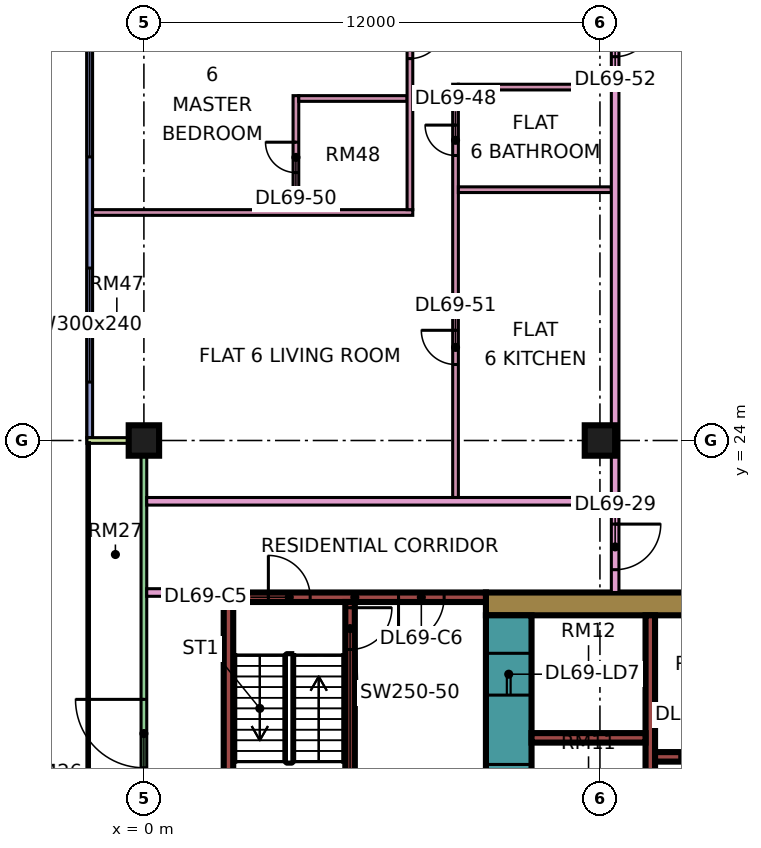
"""IFC4 building model, lengths in metres.
Left out: names, types, materials, properties, quantities, classifications, styles, units other than length and angle.
Written with IfcOpenShell. Run it as: python <this file> out.ifc"""

import sys

from ifc_helpers import new_model, si_unit, direction, frame, frame_2d, origin, origin_2d, place, context, subcontext, project, spatial, rectangle, extrude, element, fill, save


model = new_model("IFC4")
c1 = context("Model", 3, precision=1e-05, world=origin(), true_north=direction((0.0, 1.0)))
c2 = subcontext(c1, "Body", "Model", "MODEL_VIEW")
j1 = project(units=[si_unit("LENGTHUNIT", "METRE"), si_unit("PLANEANGLEUNIT", "RADIAN")], contexts=[c1])
p1 = place(None, origin())
s1 = spatial("IfcSite", under=j1, at=p1, CompositionType="ELEMENT")
p2 = place(p1, origin())
s2 = spatial("IfcBuilding", under=s1, at=p2, CompositionType="ELEMENT")
p3 = place(p2, frame((0.0, 0.0, 295.9)))
s3 = spatial("IfcBuildingStorey", under=s2, at=p3, CompositionType="ELEMENT", Elevation=295.9)
for number, where, z_axis, x_axis in (
    (1, (0.0, 24.0, 0.0), (0.0, 0.0, 1.0), (1.0, 0.0, 0.0)),
    (2, (12.0, 24.0, 0.0), (0.0, 0.0, 1.0), (1.0, 0.0, 0.0)),
):
    element("IfcColumn", number, at=place(p3, frame(where, z_axis=z_axis, x_axis=x_axis)), inside=s3, PredefinedType="COLUMN", context=c2, shape_type="SweptSolid", body=[
        extrude(rectangle(XDim=0.8, YDim=0.8, at=origin_2d()), origin(), (0.0, 0.0, 1.0), 3.75),
    ])
p4 = place(p3, frame((9.0, 19.7, 0.0), z_axis=(0.0, 0.0, 1.0), x_axis=(1.0, 0.0, 0.0)))
e3 = element("IfcWall", 3, at=p4, inside=s3, PredefinedType="SHEAR", context=c2, shape_type="SweptSolid", body=[
    extrude(rectangle(XDim=25.0, YDim=0.6, at=frame_2d((12.5, 0.0))), origin(), (0.0, 0.0, 1.0), 3.75),
])
p5 = place(p4, frame((19.1, 0.0, 0.0)))
e4 = element("IfcOpeningElement", 4, at=p5, cuts=e3, PredefinedType="OPENING", context=c2, shape_type="SweptSolid", body=[
    extrude(rectangle(XDim=1.8, YDim=2.4, at=frame_2d((0.9, 1.2))), frame((0.0, 0.31, 0.0), z_axis=(0.0, -1.0, 0.0), x_axis=(1.0, 0.0, 0.0)), (0.0, 0.0, 1.0), 0.62),
])
p6 = place(p3, frame((9.6, 7.6, 0.0), z_axis=(0.0, 0.0, 1.0), x_axis=(0.0, 1.0, 0.0)))
e5 = element("IfcWall", 5, at=p6, inside=s3, PredefinedType="SHEAR", context=c2, shape_type="SweptSolid", body=[
    extrude(rectangle(XDim=11.8, YDim=1.2, at=frame_2d((5.9, 0.0))), origin(), (0.0, 0.0, 1.0), 3.75),
])
p7 = place(p6, frame((4.275, 0.0, 0.0)))
e6 = element("IfcOpeningElement", 6, at=p7, cuts=e5, PredefinedType="OPENING", context=c2, shape_type="SweptSolid", body=[
    extrude(rectangle(XDim=1.1, YDim=2.2, at=frame_2d((0.55, 1.1))), frame((0.0, 0.61, 0.0), z_axis=(0.0, -1.0, 0.0), x_axis=(1.0, 0.0, 0.0)), (0.0, 0.0, 1.0), 1.22),
])
p8 = place(p6, frame((6.775, 0.0, 0.0)))
e7 = element("IfcOpeningElement", 7, at=p8, cuts=e5, PredefinedType="OPENING", context=c2, shape_type="SweptSolid", body=[
    extrude(rectangle(XDim=1.1, YDim=2.2, at=frame_2d((0.55, 1.1))), frame((0.0, 0.61, 0.0), z_axis=(0.0, -1.0, 0.0), x_axis=(1.0, 0.0, 0.0)), (0.0, 0.0, 1.0), 1.22),
])
p9 = place(p6, frame((9.7, 0.0, 0.0)))
e8 = element("IfcOpeningElement", 8, at=p9, cuts=e5, PredefinedType="OPENING", context=c2, shape_type="SweptSolid", body=[
    extrude(rectangle(XDim=1.1, YDim=2.2, at=frame_2d((0.55, 1.1))), frame((0.0, 0.61, 0.0), z_axis=(0.0, -1.0, 0.0), x_axis=(1.0, 0.0, 0.0)), (0.0, 0.0, 1.0), 1.22),
])
p10 = place(p6, frame((1.95, 0.0, 0.0)))
e9 = element("IfcOpeningElement", 9, at=p10, cuts=e5, PredefinedType="OPENING", context=c2, shape_type="SweptSolid", body=[
    extrude(rectangle(XDim=0.9, YDim=2.1, at=frame_2d((0.45, 1.05))), frame((0.0, 0.61, 0.0), z_axis=(0.0, -1.0, 0.0), x_axis=(1.0, 0.0, 0.0)), (0.0, 0.0, 1.0), 1.22),
])
p11 = place(p3, frame((13.325, 7.6, 0.0), z_axis=(0.0, 0.0, 1.0), x_axis=(0.0, 1.0, 0.0)))
e10 = element("IfcWall", 10, at=p11, inside=s3, PredefinedType="SHEAR", context=c2, shape_type="SweptSolid", body=[
    extrude(rectangle(XDim=11.8, YDim=0.25, at=frame_2d((5.9, 0.0))), origin(), (0.0, 0.0, 1.0), 3.75),
])
p12 = place(p3, frame((13.45, 15.675, 0.0), z_axis=(0.0, 0.0, 1.0), x_axis=(1.0, 0.0, 0.0)))
e11 = element("IfcWall", 11, at=p12, inside=s3, PredefinedType="SHEAR", context=c2, shape_type="SweptSolid", body=[
    extrude(rectangle(XDim=13.75, YDim=0.25, at=frame_2d((6.875, 0.0))), origin(), (0.0, 0.0, 1.0), 3.75),
])
p13 = place(p12, frame((0.65, 0.0, 0.0)))
e12 = element("IfcOpeningElement", 12, at=p13, cuts=e11, PredefinedType="OPENING", context=c2, shape_type="SweptSolid", body=[
    extrude(rectangle(XDim=1.2, YDim=2.2, at=frame_2d((0.6, 1.1))), frame((0.0, 0.135, 0.0), z_axis=(0.0, -1.0, 0.0), x_axis=(1.0, 0.0, 0.0)), (0.0, 0.0, 1.0), 0.27),
])
p14 = place(p12, frame((3.4, 0.0, 0.0)))
e13 = element("IfcOpeningElement", 13, at=p14, cuts=e11, PredefinedType="OPENING", context=c2, shape_type="SweptSolid", body=[
    extrude(rectangle(XDim=1.2, YDim=2.2, at=frame_2d((0.6, 1.1))), frame((0.0, 0.135, 0.0), z_axis=(0.0, -1.0, 0.0), x_axis=(1.0, 0.0, 0.0)), (0.0, 0.0, 1.0), 0.27),
])
p15 = place(p12, frame((6.15, 0.0, 0.0)))
e14 = element("IfcOpeningElement", 14, at=p15, cuts=e11, PredefinedType="OPENING", context=c2, shape_type="SweptSolid", body=[
    extrude(rectangle(XDim=1.2, YDim=2.2, at=frame_2d((0.6, 1.1))), frame((0.0, 0.135, 0.0), z_axis=(0.0, -1.0, 0.0), x_axis=(1.0, 0.0, 0.0)), (0.0, 0.0, 1.0), 0.27),
])
p16 = place(p12, frame((8.9, 0.0, 0.0)))
e15 = element("IfcOpeningElement", 15, at=p16, cuts=e11, PredefinedType="OPENING", context=c2, shape_type="SweptSolid", body=[
    extrude(rectangle(XDim=1.2, YDim=2.2, at=frame_2d((0.6, 1.1))), frame((0.0, 0.135, 0.0), z_axis=(0.0, -1.0, 0.0), x_axis=(1.0, 0.0, 0.0)), (0.0, 0.0, 1.0), 0.27),
])
p17 = place(p12, frame((11.8, 0.0, 0.0)))
e16 = element("IfcOpeningElement", 16, at=p17, cuts=e11, PredefinedType="OPENING", context=c2, shape_type="SweptSolid", body=[
    extrude(rectangle(XDim=0.9, YDim=2.1, at=frame_2d((0.45, 1.05))), frame((0.0, 0.135, 0.0), z_axis=(0.0, -1.0, 0.0), x_axis=(1.0, 0.0, 0.0)), (0.0, 0.0, 1.0), 0.27),
])
p18 = place(p3, frame((10.2, 16.175, 0.0), z_axis=(0.0, 0.0, 1.0), x_axis=(1.0, 0.0, 0.0)))
e17 = element("IfcWall", 17, at=p18, inside=s3, PredefinedType="SHEAR", context=c2, shape_type="SweptSolid", body=[
    extrude(rectangle(XDim=3.0, YDim=0.25, at=frame_2d((1.5, 0.0))), origin(), (0.0, 0.0, 1.0), 3.75),
])
p19 = place(p3, frame((2.1, 19.875, 0.0), z_axis=(0.0, 0.0, 1.0), x_axis=(1.0, 0.0, 0.0)))
e18 = element("IfcWall", 18, at=p19, inside=s3, PredefinedType="SHEAR", context=c2, shape_type="SweptSolid", body=[
    extrude(rectangle(XDim=6.9, YDim=0.25, at=frame_2d((3.45, 0.0))), origin(), (0.0, 0.0, 1.0), 3.75),
])
p20 = place(p19, frame((1.175, 0.0, 0.0)))
e19 = element("IfcOpeningElement", 19, at=p20, cuts=e18, PredefinedType="OPENING", context=c2, shape_type="SweptSolid", body=[
    extrude(rectangle(XDim=1.1, YDim=2.2, at=frame_2d((0.55, 1.1))), frame((0.0, 0.135, 0.0), z_axis=(0.0, -1.0, 0.0), x_axis=(1.0, 0.0, 0.0)), (0.0, 0.0, 1.0), 0.27),
])
p21 = place(p19, frame((4.6, 0.0, 0.0)))
e20 = element("IfcOpeningElement", 20, at=p21, cuts=e18, PredefinedType="OPENING", context=c2, shape_type="SweptSolid", body=[
    extrude(rectangle(XDim=1.2, YDim=2.2, at=frame_2d((0.6, 1.1))), frame((0.0, 0.135, 0.0), z_axis=(0.0, -1.0, 0.0), x_axis=(1.0, 0.0, 0.0)), (0.0, 0.0, 1.0), 0.27),
])
p22 = place(p3, frame((2.225, 13.25, 0.0), z_axis=(0.0, 0.0, 1.0), x_axis=(0.0, 1.0, 0.0)))
e21 = element("IfcWall", 21, at=p22, inside=s3, PredefinedType="SHEAR", context=c2, shape_type="SweptSolid", body=[
    extrude(rectangle(XDim=6.5, YDim=0.25, at=frame_2d((3.25, 0.0))), origin(), (0.0, 0.0, 1.0), 3.75),
])
p23 = place(p3, frame((5.425, 13.25, 0.0), z_axis=(0.0, 0.0, 1.0), x_axis=(0.0, 1.0, 0.0)))
e22 = element("IfcWall", 22, at=p23, inside=s3, PredefinedType="SHEAR", context=c2, shape_type="SweptSolid", body=[
    extrude(rectangle(XDim=6.5, YDim=0.25, at=frame_2d((3.25, 0.0))), origin(), (0.0, 0.0, 1.0), 3.75),
])
p24 = place(p23, frame((5.25, 0.0, 0.0)))
e23 = element("IfcOpeningElement", 23, at=p24, cuts=e22, PredefinedType="OPENING", context=c2, shape_type="SweptSolid", body=[
    extrude(rectangle(XDim=1.1, YDim=2.2, at=frame_2d((0.55, 1.1))), frame((0.0, 0.135, 0.0), z_axis=(0.0, -1.0, 0.0), x_axis=(1.0, 0.0, 0.0)), (0.0, 0.0, 1.0), 0.27),
])
p25 = place(p3, frame((-1.425, 35.925, 0.0), z_axis=(0.0, 0.0, 1.0), x_axis=(0.0, -1.0, 0.0)))
e24 = element("IfcWall", 24, at=p25, inside=s3, PredefinedType="SOLIDWALL", context=c2, shape_type="SweptSolid", body=[
    extrude(rectangle(XDim=11.85, YDim=0.15, at=frame_2d((5.925, 0.0))), origin(), (0.0, 0.0, 1.0), 3.35),
])
p26 = place(p25, frame((1.462, 0.0, 0.45)))
e25 = element("IfcOpeningElement", 25, at=p26, cuts=e24, PredefinedType="OPENING", context=c2, shape_type="SweptSolid", body=[
    extrude(rectangle(XDim=3.0, YDim=2.4, at=frame_2d((1.5, 1.2))), frame((0.0, 0.085, 0.0), z_axis=(0.0, -1.0, 0.0), x_axis=(1.0, 0.0, 0.0)), (0.0, 0.0, 1.0), 0.17),
])
p27 = place(p25, frame((7.387, 0.0, 0.45)))
e26 = element("IfcOpeningElement", 26, at=p27, cuts=e24, PredefinedType="OPENING", context=c2, shape_type="SweptSolid", body=[
    extrude(rectangle(XDim=3.0, YDim=2.4, at=frame_2d((1.5, 1.2))), frame((0.0, 0.085, 0.0), z_axis=(0.0, -1.0, 0.0), x_axis=(1.0, 0.0, 0.0)), (0.0, 0.0, 1.0), 0.17),
])
p28 = place(p3, frame((0.0, 23.925, 0.0), z_axis=(0.0, 0.0, 1.0), x_axis=(0.0, -1.0, 0.0)))
e27 = element("IfcWall", 27, at=p28, inside=s3, PredefinedType="SOLIDWALL", context=c2, shape_type="SweptSolid", body=[
    extrude(rectangle(XDim=11.35, YDim=0.15, at=frame_2d((5.675, 0.0))), origin(), (0.0, 0.0, 1.0), 3.35),
])
p29 = place(p28, frame((6.738, 0.0, 0.0)))
e28 = element("IfcOpeningElement", 28, at=p29, cuts=e27, PredefinedType="OPENING", context=c2, shape_type="SweptSolid", body=[
    extrude(rectangle(XDim=1.8, YDim=2.4, at=frame_2d((0.9, 1.2))), frame((0.0, 0.085, 0.0), z_axis=(0.0, -1.0, 0.0), x_axis=(1.0, 0.0, 0.0)), (0.0, 0.0, 1.0), 0.17),
])
p30 = place(p3, frame((-1.5, 24.0, 0.0), z_axis=(0.0, 0.0, 1.0), x_axis=(1.0, 0.0, 0.0)))
e29 = element("IfcWall", 29, at=p30, inside=s3, PredefinedType="SOLIDWALL", context=c2, shape_type="SweptSolid", body=[
    extrude(rectangle(XDim=1.5, YDim=0.15, at=frame_2d((0.75, 0.0))), origin(), (0.0, 0.0, 1.0), 3.35),
])
p31 = place(p3, frame((-1.35, 30.0, 0.0), z_axis=(0.0, 0.0, 1.0), x_axis=(1.0, 0.0, 0.0)))
e30 = element("IfcWall", 30, at=p31, inside=s3, PredefinedType="PARTITIONING", context=c2, shape_type="SweptSolid", body=[
    extrude(rectangle(XDim=8.425, YDim=0.15, at=frame_2d((4.212, 0.0))), origin(), (0.0, 0.0, 1.0), 3.35),
])
p32 = place(p3, frame((0.074, 20.0, 0.0), z_axis=(0.0, 0.0, 1.0), x_axis=(1.0, 0.0, 0.0)))
e31 = element("IfcWall", 31, at=p32, inside=s3, PredefinedType="PARTITIONING", context=c2, shape_type="SweptSolid", body=[
    extrude(rectangle(XDim=2.026, YDim=0.2, at=frame_2d((1.013, 0.0))), origin(), (0.0, 0.0, 1.0), 3.35),
])
p33 = place(p3, frame((0.074, 22.4, 0.0), z_axis=(0.0, 0.0, 1.0), x_axis=(1.0, 0.0, 0.0)))
e32 = element("IfcWall", 32, at=p33, inside=s3, PredefinedType="PARTITIONING", context=c2, shape_type="SweptSolid", body=[
    extrude(rectangle(XDim=12.226, YDim=0.2, at=frame_2d((6.113, 0.0))), origin(), (0.0, 0.0, 1.0), 3.35),
])
p34 = place(p3, frame((4.0, 30.075, 0.0), z_axis=(0.0, 0.0, 1.0), x_axis=(0.0, 1.0, 0.0)))
e33 = element("IfcWall", 33, at=p34, inside=s3, PredefinedType="PARTITIONING", context=c2, shape_type="SweptSolid", body=[
    extrude(rectangle(XDim=3.0, YDim=0.15, at=frame_2d((1.5, 0.0))), origin(), (0.0, 0.0, 1.0), 3.35),
])
p35 = place(p34, frame((0.975, 0.0, 0.0)))
e34 = element("IfcOpeningElement", 34, at=p35, cuts=e33, PredefinedType="OPENING", context=c2, shape_type="SweptSolid", body=[
    extrude(rectangle(XDim=0.8, YDim=2.1, at=frame_2d((0.4, 1.05))), frame((0.0, 0.085, 0.0), z_axis=(0.0, -1.0, 0.0), x_axis=(1.0, 0.0, 0.0)), (0.0, 0.0, 1.0), 0.17),
])
p36 = place(p3, frame((4.075, 33.0, 0.0), z_axis=(0.0, 0.0, 1.0), x_axis=(1.0, 0.0, 0.0)))
e35 = element("IfcWall", 35, at=p36, inside=s3, PredefinedType="PARTITIONING", context=c2, shape_type="SweptSolid", body=[
    extrude(rectangle(XDim=2.85, YDim=0.15, at=frame_2d((1.425, 0.0))), origin(), (0.0, 0.0, 1.0), 3.35),
])
p37 = place(p3, frame((7.0, 30.075, 0.0), z_axis=(0.0, 0.0, 1.0), x_axis=(0.0, 1.0, 0.0)))
e36 = element("IfcWall", 36, at=p37, inside=s3, PredefinedType="PARTITIONING", context=c2, shape_type="SweptSolid", body=[
    extrude(rectangle(XDim=5.825, YDim=0.15, at=frame_2d((2.913, 0.0))), origin(), (0.0, 0.0, 1.0), 3.35),
])
p38 = place(p37, frame((3.975, 0.0, 0.0)))
e37 = element("IfcOpeningElement", 37, at=p38, cuts=e36, PredefinedType="OPENING", context=c2, shape_type="SweptSolid", body=[
    extrude(rectangle(XDim=0.9, YDim=2.1, at=frame_2d((0.45, 1.05))), frame((0.0, 0.085, 0.0), z_axis=(0.0, -1.0, 0.0), x_axis=(1.0, 0.0, 0.0)), (0.0, 0.0, 1.0), 0.17),
])
p39 = place(p3, frame((8.2, 22.5, 0.0), z_axis=(0.0, 0.0, 1.0), x_axis=(0.0, 1.0, 0.0)))
e38 = element("IfcWall", 38, at=p39, inside=s3, PredefinedType="PARTITIONING", context=c2, shape_type="SweptSolid", body=[
    extrude(rectangle(XDim=10.875, YDim=0.15, at=frame_2d((5.438, 0.0))), origin(), (0.0, 0.0, 1.0), 3.35),
])
p40 = place(p39, frame((9.0, 0.0, 0.0)))
e39 = element("IfcOpeningElement", 39, at=p40, cuts=e38, PredefinedType="OPENING", context=c2, shape_type="SweptSolid", body=[
    extrude(rectangle(XDim=0.8, YDim=2.1, at=frame_2d((0.4, 1.05))), frame((0.0, 0.085, 0.0), z_axis=(0.0, -1.0, 0.0), x_axis=(1.0, 0.0, 0.0)), (0.0, 0.0, 1.0), 0.17),
])
p41 = place(p39, frame((3.5, 0.0, 0.0)))
e40 = element("IfcOpeningElement", 40, at=p41, cuts=e38, PredefinedType="OPENING", context=c2, shape_type="SweptSolid", body=[
    extrude(rectangle(XDim=0.9, YDim=2.1, at=frame_2d((0.45, 1.05))), frame((0.0, 0.085, 0.0), z_axis=(0.0, -1.0, 0.0), x_axis=(1.0, 0.0, 0.0)), (0.0, 0.0, 1.0), 0.17),
])
for number, where, z_axis, x_axis in (
    (41, (8.275, 30.6, 0.0), (0.0, 0.0, 1.0), (1.0, 0.0, 0.0)),
    (42, (8.275, 33.3, 0.0), (0.0, 0.0, 1.0), (1.0, 0.0, 0.0)),
):
    element("IfcWall", number, at=place(p3, frame(where, z_axis=z_axis, x_axis=x_axis)), inside=s3, PredefinedType="PARTITIONING", context=c2, shape_type="SweptSolid", body=[
        extrude(rectangle(XDim=4.025, YDim=0.15, at=frame_2d((2.013, 0.0))), origin(), (0.0, 0.0, 1.0), 3.35),
    ])
p42 = place(p3, frame((12.4, 20.0, 0.0), z_axis=(0.0, 0.0, 1.0), x_axis=(0.0, 1.0, 0.0)))
e43 = element("IfcWall", 43, at=p42, inside=s3, PredefinedType="PARTITIONING", context=c2, shape_type="SweptSolid", body=[
    extrude(rectangle(XDim=33.926, YDim=0.2, at=frame_2d((16.963, 0.0))), origin(), (0.0, 0.0, 1.0), 3.35),
])
p43 = place(p42, frame((32.1, 0.0, 0.0)))
e44 = element("IfcOpeningElement", 44, at=p43, cuts=e43, PredefinedType="OPENING", context=c2, shape_type="SweptSolid", body=[
    extrude(rectangle(XDim=1.0, YDim=2.1, at=frame_2d((0.5, 1.05))), frame((0.0, 0.11, 0.0), z_axis=(0.0, -1.0, 0.0), x_axis=(1.0, 0.0, 0.0)), (0.0, 0.0, 1.0), 0.22),
])
p44 = place(p42, frame((0.6, 0.0, 0.0)))
e45 = element("IfcOpeningElement", 45, at=p44, cuts=e43, PredefinedType="OPENING", context=c2, shape_type="SweptSolid", body=[
    extrude(rectangle(XDim=1.2, YDim=2.1, at=frame_2d((0.6, 1.05))), frame((0.0, 0.11, 0.0), z_axis=(0.0, -1.0, 0.0), x_axis=(1.0, 0.0, 0.0)), (0.0, 0.0, 1.0), 0.22),
])
p45 = place(p42, frame((14.1, 0.0, 0.0)))
e46 = element("IfcOpeningElement", 46, at=p45, cuts=e43, PredefinedType="OPENING", context=c2, shape_type="SweptSolid", body=[
    extrude(rectangle(XDim=1.0, YDim=2.1, at=frame_2d((0.5, 1.05))), frame((0.0, 0.11, 0.0), z_axis=(0.0, -1.0, 0.0), x_axis=(1.0, 0.0, 0.0)), (0.0, 0.0, 1.0), 0.22),
])
p46 = place(p26, origin())
e47 = element("IfcWindow", 47, at=p46, inside=s3, PartitioningType="SINGLE_PANEL", PredefinedType="WINDOW", context=c2, shape_type="SweptSolid", body=[
    extrude(rectangle(XDim=3.0, YDim=2.4, at=frame_2d((1.5, 1.2))), frame((0.0, 0.03, 0.0), z_axis=(0.0, -1.0, 0.0), x_axis=(1.0, 0.0, 0.0)), (0.0, 0.0, 1.0), 0.06),
])
fill(e25, e47)
p47 = place(p27, origin())
e48 = element("IfcWindow", 48, at=p47, inside=s3, PartitioningType="SINGLE_PANEL", PredefinedType="WINDOW", context=c2, shape_type="SweptSolid", body=[
    extrude(rectangle(XDim=3.0, YDim=2.4, at=frame_2d((1.5, 1.2))), frame((0.0, 0.03, 0.0), z_axis=(0.0, -1.0, 0.0), x_axis=(1.0, 0.0, 0.0)), (0.0, 0.0, 1.0), 0.06),
])
fill(e26, e48)
p48 = place(p29, frame((1.8, 0.0, 0.0), z_axis=(0.0, 0.0, 1.0), x_axis=(-1.0, 0.0, 0.0)))
e49 = element("IfcDoor", 49, at=p48, inside=s3, OperationType="DOUBLE_DOOR_SINGLE_SWING", PredefinedType="DOOR", context=c2, shape_type="SweptSolid", body=[
    extrude(rectangle(XDim=1.8, YDim=2.4, at=frame_2d((0.9, 1.2))), frame((0.0, 0.025, 0.0), z_axis=(0.0, -1.0, 0.0), x_axis=(1.0, 0.0, 0.0)), (0.0, 0.0, 1.0), 0.05),
])
fill(e28, e49)
p49 = place(p13, origin())
e50 = element("IfcDoor", 50, at=p49, inside=s3, OperationType="DOUBLE_DOOR_SLIDING", PredefinedType="DOOR", context=c2, shape_type="SweptSolid", body=[
    extrude(rectangle(XDim=1.2, YDim=2.2, at=frame_2d((0.6, 1.1))), frame((0.0, 0.025, 0.0), z_axis=(0.0, -1.0, 0.0), x_axis=(1.0, 0.0, 0.0)), (0.0, 0.0, 1.0), 0.05),
])
fill(e12, e50)
p50 = place(p8, origin())
e51 = element("IfcDoor", 51, at=p50, inside=s3, OperationType="DOUBLE_DOOR_SLIDING", PredefinedType="DOOR", context=c2, shape_type="SweptSolid", body=[
    extrude(rectangle(XDim=1.1, YDim=2.2, at=frame_2d((0.55, 1.1))), frame((0.0, 0.025, 0.0), z_axis=(0.0, -1.0, 0.0), x_axis=(1.0, 0.0, 0.0)), (0.0, 0.0, 1.0), 0.05),
])
fill(e7, e51)
p51 = place(p9, origin())
e52 = element("IfcDoor", 52, at=p51, inside=s3, OperationType="DOUBLE_DOOR_SLIDING", PredefinedType="DOOR", context=c2, shape_type="SweptSolid", body=[
    extrude(rectangle(XDim=1.1, YDim=2.2, at=frame_2d((0.55, 1.1))), frame((0.0, 0.025, 0.0), z_axis=(0.0, -1.0, 0.0), x_axis=(1.0, 0.0, 0.0)), (0.0, 0.0, 1.0), 0.05),
])
fill(e8, e52)
p52 = place(p24, origin())
e53 = element("IfcDoor", 53, at=p52, inside=s3, OperationType="SINGLE_SWING_RIGHT", PredefinedType="DOOR", context=c2, shape_type="SweptSolid", body=[
    extrude(rectangle(XDim=1.1, YDim=2.2, at=frame_2d((0.55, 1.1))), frame((0.0, 0.025, 0.0), z_axis=(0.0, -1.0, 0.0), x_axis=(1.0, 0.0, 0.0)), (0.0, 0.0, 1.0), 0.05),
])
fill(e23, e53)
p53 = place(p20, origin())
e54 = element("IfcDoor", 54, at=p53, inside=s3, OperationType="SINGLE_SWING_LEFT", PredefinedType="DOOR", context=c2, shape_type="SweptSolid", body=[
    extrude(rectangle(XDim=1.1, YDim=2.2, at=frame_2d((0.55, 1.1))), frame((0.0, 0.025, 0.0), z_axis=(0.0, -1.0, 0.0), x_axis=(1.0, 0.0, 0.0)), (0.0, 0.0, 1.0), 0.05),
])
fill(e19, e54)
p54 = place(p21, frame((1.2, 0.0, 0.0), z_axis=(0.0, 0.0, 1.0), x_axis=(-1.0, 0.0, 0.0)))
e55 = element("IfcDoor", 55, at=p54, inside=s3, OperationType="SINGLE_SWING_LEFT", PredefinedType="DOOR", context=c2, shape_type="SweptSolid", body=[
    extrude(rectangle(XDim=1.2, YDim=2.2, at=frame_2d((0.6, 1.1))), frame((0.0, 0.025, 0.0), z_axis=(0.0, -1.0, 0.0), x_axis=(1.0, 0.0, 0.0)), (0.0, 0.0, 1.0), 0.05),
])
fill(e20, e55)
p55 = place(p44, origin())
e56 = element("IfcDoor", 56, at=p55, inside=s3, OperationType="SINGLE_SWING_RIGHT", PredefinedType="DOOR", context=c2, shape_type="SweptSolid", body=[
    extrude(rectangle(XDim=1.2, YDim=2.1, at=frame_2d((0.6, 1.05))), frame((0.0, 0.025, 0.0), z_axis=(0.0, -1.0, 0.0), x_axis=(1.0, 0.0, 0.0)), (0.0, 0.0, 1.0), 0.05),
])
fill(e45, e56)
p56 = place(p40, frame((0.8, 0.0, 0.0), z_axis=(0.0, 0.0, 1.0), x_axis=(-1.0, 0.0, 0.0)))
e57 = element("IfcDoor", 57, at=p56, inside=s3, OperationType="SINGLE_SWING_RIGHT", PredefinedType="DOOR", context=c2, shape_type="SweptSolid", body=[
    extrude(rectangle(XDim=0.8, YDim=2.1, at=frame_2d((0.4, 1.05))), frame((0.0, 0.025, 0.0), z_axis=(0.0, -1.0, 0.0), x_axis=(1.0, 0.0, 0.0)), (0.0, 0.0, 1.0), 0.05),
])
fill(e39, e57)
p57 = place(p38, origin())
e58 = element("IfcDoor", 58, at=p57, inside=s3, OperationType="SINGLE_SWING_RIGHT", PredefinedType="DOOR", context=c2, shape_type="SweptSolid", body=[
    extrude(rectangle(XDim=0.9, YDim=2.1, at=frame_2d((0.45, 1.05))), frame((0.0, 0.025, 0.0), z_axis=(0.0, -1.0, 0.0), x_axis=(1.0, 0.0, 0.0)), (0.0, 0.0, 1.0), 0.05),
])
fill(e37, e58)
p58 = place(p35, frame((0.8, 0.0, 0.0), z_axis=(0.0, 0.0, 1.0), x_axis=(-1.0, 0.0, 0.0)))
e59 = element("IfcDoor", 59, at=p58, inside=s3, OperationType="SINGLE_SWING_RIGHT", PredefinedType="DOOR", context=c2, shape_type="SweptSolid", body=[
    extrude(rectangle(XDim=0.8, YDim=2.1, at=frame_2d((0.4, 1.05))), frame((0.0, 0.025, 0.0), z_axis=(0.0, -1.0, 0.0), x_axis=(1.0, 0.0, 0.0)), (0.0, 0.0, 1.0), 0.05),
])
fill(e34, e59)
p59 = place(p41, frame((0.9, 0.0, 0.0), z_axis=(0.0, 0.0, 1.0), x_axis=(-1.0, 0.0, 0.0)))
e60 = element("IfcDoor", 60, at=p59, inside=s3, OperationType="SINGLE_SWING_RIGHT", PredefinedType="DOOR", context=c2, shape_type="SweptSolid", body=[
    extrude(rectangle(XDim=0.9, YDim=2.1, at=frame_2d((0.45, 1.05))), frame((0.0, 0.025, 0.0), z_axis=(0.0, -1.0, 0.0), x_axis=(1.0, 0.0, 0.0)), (0.0, 0.0, 1.0), 0.05),
])
fill(e40, e60)
p60 = place(p45, origin())
e61 = element("IfcDoor", 61, at=p60, inside=s3, OperationType="SINGLE_SWING_RIGHT", PredefinedType="DOOR", context=c2, shape_type="SweptSolid", body=[
    extrude(rectangle(XDim=1.0, YDim=2.1, at=frame_2d((0.5, 1.05))), frame((0.0, 0.025, 0.0), z_axis=(0.0, -1.0, 0.0), x_axis=(1.0, 0.0, 0.0)), (0.0, 0.0, 1.0), 0.05),
])
fill(e46, e61)
save(model, sys.argv[1])
